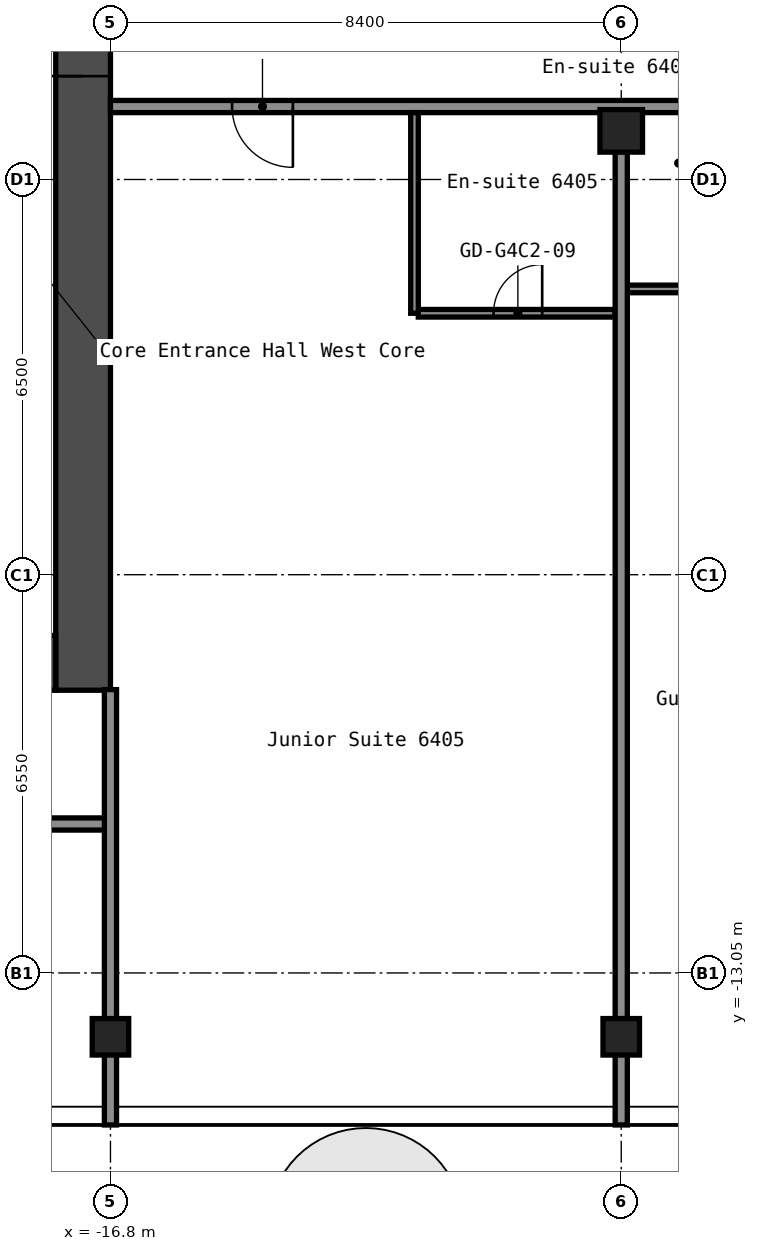
"""IFC4 building model, lengths in metres.
Left out: names, types, materials, properties, quantities, classifications, styles, units other than length and angle.
Written with IfcOpenShell. Run it as: python <this file> out.ifc"""

import sys

from ifc_helpers import new_model, si_unit, direction, frame, frame_2d, origin, origin_2d, place, context, subcontext, project, spatial, rectangle, hollow_rectangle, extrude, element, fill, save


model = new_model("IFC4")
c1 = context("Model", 3, precision=1e-05, world=origin(), true_north=direction((0.0, 1.0)))
c2 = subcontext(c1, "Body", "Model", "MODEL_VIEW")
j1 = project(units=[si_unit("LENGTHUNIT", "METRE"), si_unit("PLANEANGLEUNIT", "RADIAN")], contexts=[c1])
p1 = place(None, origin())
s1 = spatial("IfcSite", under=j1, at=p1, CompositionType="ELEMENT")
p2 = place(p1, origin())
s2 = spatial("IfcBuilding", under=s1, at=p2, CompositionType="ELEMENT")
p3 = place(p2, frame((0.0, 0.0, 225.0)))
s3 = spatial("IfcBuildingStorey", under=s2, at=p3, CompositionType="ELEMENT", Elevation=225.0)
for number, where, z_axis, x_axis in (
    (1, (-16.8, -14.1, 0.0), (0.0, 0.0, 1.0), (1.0, 0.0, 0.0)),
    (2, (-8.4, -14.1, 0.0), (0.0, 0.0, 1.0), (1.0, 0.0, 0.0)),
):
    element("IfcColumn", number, at=place(p3, frame(where, z_axis=z_axis, x_axis=x_axis)), inside=s3, PredefinedType="COLUMN", context=c2, shape_type="SweptSolid", body=[
        extrude(hollow_rectangle(XDim=0.6, YDim=0.6, WallThickness=0.025, InnerFilletRadius=0.038, OuterFilletRadius=0.062, at=origin_2d()), origin(), (0.0, 0.0, 1.0), 2.9),
    ])
p4 = place(p3, frame((-8.4, 0.8, 0.0), z_axis=(0.0, 0.0, 1.0), x_axis=(1.0, 0.0, 0.0)))
e3 = element("IfcColumn", 3, at=p4, inside=s3, PredefinedType="COLUMN", context=c2, shape_type="SweptSolid", body=[
    extrude(hollow_rectangle(XDim=0.7, YDim=0.7, WallThickness=0.028, at=origin_2d()), origin(), (0.0, 0.0, 1.0), 2.9),
])
p5 = place(p3, frame((-17.25, -8.4, 0.0), z_axis=(0.0, 0.0, 1.0), x_axis=(0.0, 1.0, 0.0)))
e4 = element("IfcWall", 4, at=p5, inside=s3, PredefinedType="SHEAR", context=c2, shape_type="SweptSolid", body=[
    extrude(rectangle(XDim=16.8, YDim=0.9, at=frame_2d((8.4, 0.0))), origin(), (0.0, 0.0, 1.0), 2.9),
])
p6 = place(p5, frame((10.1, 0.0, 0.0)))
e5 = element("IfcOpeningElement", 5, at=p6, cuts=e4, PredefinedType="OPENING", context=c2, shape_type="SweptSolid", body=[
    extrude(rectangle(XDim=1.6, YDim=2.1, at=frame_2d((0.8, 1.05))), frame((0.0, 0.46, 0.0), z_axis=(0.0, -1.0, 0.0), x_axis=(1.0, 0.0, 0.0)), (0.0, 0.0, 1.0), 0.92),
])
p7 = place(p3, frame((-32.7, -7.95, 0.0), z_axis=(0.0, 0.0, 1.0), x_axis=(1.0, 0.0, 0.0)))
e6 = element("IfcWall", 6, at=p7, inside=s3, PredefinedType="SHEAR", context=c2, shape_type="SweptSolid", body=[
    extrude(rectangle(XDim=15.0, YDim=0.9, at=frame_2d((7.5, 0.0))), origin(), (0.0, 0.0, 1.0), 2.9),
])
p8 = place(p7, frame((11.45, 0.0, 0.0)))
e7 = element("IfcOpeningElement", 7, at=p8, cuts=e6, PredefinedType="OPENING", context=c2, shape_type="SweptSolid", body=[
    extrude(rectangle(XDim=1.0, YDim=2.1, at=frame_2d((0.5, 1.05))), frame((0.0, 0.46, 0.0), z_axis=(0.0, -1.0, 0.0), x_axis=(1.0, 0.0, 0.0)), (0.0, 0.0, 1.0), 0.92),
])
p9 = place(p3, frame((-38.1, -10.6, 0.0), z_axis=(0.0, 0.0, 1.0), x_axis=(1.0, 0.0, 0.0)))
e8 = element("IfcWall", 8, at=p9, inside=s3, PredefinedType="PARTITIONING", context=c2, shape_type="SweptSolid", body=[
    extrude(rectangle(XDim=21.3, YDim=0.2, at=frame_2d((10.65, 0.0))), origin(), (0.0, 0.0, 1.0), 2.9),
])
p10 = place(p9, frame((1.95, 0.0, 0.0)))
e9 = element("IfcOpeningElement", 9, at=p10, cuts=e8, PredefinedType="OPENING", context=c2, shape_type="SweptSolid", body=[
    extrude(rectangle(XDim=0.9, YDim=2.1, at=frame_2d((0.45, 1.05))), frame((0.0, 0.11, 0.0), z_axis=(0.0, -1.0, 0.0), x_axis=(1.0, 0.0, 0.0)), (0.0, 0.0, 1.0), 0.22),
])
p11 = place(p9, frame((8.2, 0.0, 0.0)))
e10 = element("IfcOpeningElement", 10, at=p11, cuts=e8, PredefinedType="OPENING", context=c2, shape_type="SweptSolid", body=[
    extrude(rectangle(XDim=1.0, YDim=2.1, at=frame_2d((0.5, 1.05))), frame((0.0, 0.11, 0.0), z_axis=(0.0, -1.0, 0.0), x_axis=(1.0, 0.0, 0.0)), (0.0, 0.0, 1.0), 0.22),
])
p12 = place(p9, frame((16.6, 0.0, 0.0)))
e11 = element("IfcOpeningElement", 11, at=p12, cuts=e8, PredefinedType="OPENING", context=c2, shape_type="SweptSolid", body=[
    extrude(rectangle(XDim=1.0, YDim=2.1, at=frame_2d((0.5, 1.05))), frame((0.0, 0.11, 0.0), z_axis=(0.0, -1.0, 0.0), x_axis=(1.0, 0.0, 0.0)), (0.0, 0.0, 1.0), 0.22),
])
p13 = place(p3, frame((-11.738, -2.2, 0.0), z_axis=(0.0, 0.0, 1.0), x_axis=(1.0, 0.0, 0.0)))
e12 = element("IfcWall", 12, at=p13, inside=s3, PredefinedType="PARTITIONING", context=c2, shape_type="SweptSolid", body=[
    extrude(rectangle(XDim=3.238, YDim=0.125, at=frame_2d((1.619, 0.0))), origin(), (0.0, 0.0, 1.0), 2.9),
])
p14 = place(p13, frame((1.238, 0.0, 0.0)))
e13 = element("IfcOpeningElement", 13, at=p14, cuts=e12, PredefinedType="OPENING", context=c2, shape_type="SweptSolid", body=[
    extrude(rectangle(XDim=0.8, YDim=2.1, at=frame_2d((0.4, 1.05))), frame((0.0, 0.073, 0.0), z_axis=(0.0, -1.0, 0.0), x_axis=(1.0, 0.0, 0.0)), (0.0, 0.0, 1.0), 0.145),
])
p15 = place(p3, frame((-8.3, -1.8, 0.0), z_axis=(0.0, 0.0, 1.0), x_axis=(1.0, 0.0, 0.0)))
e14 = element("IfcWall", 14, at=p15, inside=s3, PredefinedType="PARTITIONING", context=c2, shape_type="SweptSolid", body=[
    extrude(rectangle(XDim=2.338, YDim=0.125, at=frame_2d((1.169, 0.0))), origin(), (0.0, 0.0, 1.0), 2.9),
])
p16 = place(p3, frame((-16.8, 1.2, 0.0), z_axis=(0.0, 0.0, 1.0), x_axis=(1.0, 0.0, 0.0)))
e15 = element("IfcWall", 15, at=p16, inside=s3, PredefinedType="PARTITIONING", context=c2, shape_type="SweptSolid", body=[
    extrude(rectangle(XDim=33.6, YDim=0.2, at=frame_2d((16.8, 0.0))), origin(), (0.0, 0.0, 1.0), 2.9),
])
p17 = place(p16, frame((2.0, 0.0, 0.0)))
e16 = element("IfcOpeningElement", 16, at=p17, cuts=e15, PredefinedType="OPENING", context=c2, shape_type="SweptSolid", body=[
    extrude(rectangle(XDim=1.0, YDim=2.1, at=frame_2d((0.5, 1.05))), frame((0.0, 0.11, 0.0), z_axis=(0.0, -1.0, 0.0), x_axis=(1.0, 0.0, 0.0)), (0.0, 0.0, 1.0), 0.22),
])
p18 = place(p16, frame((11.25, 0.0, 0.0)))
e17 = element("IfcOpeningElement", 17, at=p18, cuts=e15, PredefinedType="OPENING", context=c2, shape_type="SweptSolid", body=[
    extrude(rectangle(XDim=1.0, YDim=2.1, at=frame_2d((0.5, 1.05))), frame((0.0, 0.11, 0.0), z_axis=(0.0, -1.0, 0.0), x_axis=(1.0, 0.0, 0.0)), (0.0, 0.0, 1.0), 0.22),
])
p19 = place(p16, frame((12.95, 0.0, 0.0)))
e18 = element("IfcOpeningElement", 18, at=p19, cuts=e15, PredefinedType="OPENING", context=c2, shape_type="SweptSolid", body=[
    extrude(rectangle(XDim=1.0, YDim=2.1, at=frame_2d((0.5, 1.05))), frame((0.0, 0.11, 0.0), z_axis=(0.0, -1.0, 0.0), x_axis=(1.0, 0.0, 0.0)), (0.0, 0.0, 1.0), 0.22),
])
p20 = place(p16, frame((18.785, 0.0, 0.0)))
e19 = element("IfcOpeningElement", 19, at=p20, cuts=e15, PredefinedType="OPENING", context=c2, shape_type="SweptSolid", body=[
    extrude(rectangle(XDim=0.9, YDim=2.1, at=frame_2d((0.45, 1.05))), frame((0.0, 0.11, 0.0), z_axis=(0.0, -1.0, 0.0), x_axis=(1.0, 0.0, 0.0)), (0.0, 0.0, 1.0), 0.22),
])
p21 = place(p16, frame((22.985, 0.0, 0.0)))
e20 = element("IfcOpeningElement", 20, at=p21, cuts=e15, PredefinedType="OPENING", context=c2, shape_type="SweptSolid", body=[
    extrude(rectangle(XDim=0.9, YDim=2.1, at=frame_2d((0.45, 1.05))), frame((0.0, 0.11, 0.0), z_axis=(0.0, -1.0, 0.0), x_axis=(1.0, 0.0, 0.0)), (0.0, 0.0, 1.0), 0.22),
])
p22 = place(p16, frame((28.05, 0.0, 0.0)))
e21 = element("IfcOpeningElement", 21, at=p22, cuts=e15, PredefinedType="OPENING", context=c2, shape_type="SweptSolid", body=[
    extrude(rectangle(XDim=1.0, YDim=2.1, at=frame_2d((0.5, 1.05))), frame((0.0, 0.11, 0.0), z_axis=(0.0, -1.0, 0.0), x_axis=(1.0, 0.0, 0.0)), (0.0, 0.0, 1.0), 0.22),
])
p23 = place(p16, frame((29.75, 0.0, 0.0)))
e22 = element("IfcOpeningElement", 22, at=p23, cuts=e15, PredefinedType="OPENING", context=c2, shape_type="SweptSolid", body=[
    extrude(rectangle(XDim=1.0, YDim=2.1, at=frame_2d((0.5, 1.05))), frame((0.0, 0.11, 0.0), z_axis=(0.0, -1.0, 0.0), x_axis=(1.0, 0.0, 0.0)), (0.0, 0.0, 1.0), 0.22),
])
p24 = place(p3, frame((-16.8, -15.55, 0.0), z_axis=(0.0, 0.0, 1.0), x_axis=(0.0, 1.0, 0.0)))
e23 = element("IfcWall", 23, at=p24, inside=s3, PredefinedType="PARTITIONING", context=c2, shape_type="SweptSolid", body=[
    extrude(rectangle(XDim=7.16, YDim=0.2, at=frame_2d((3.58, 0.0))), origin(), (0.0, 0.0, 1.0), 2.9),
])
p25 = place(p3, frame((-11.8, -2.2, 0.0), z_axis=(0.0, 0.0, 1.0), x_axis=(0.0, 1.0, 0.0)))
e24 = element("IfcWall", 24, at=p25, inside=s3, PredefinedType="PARTITIONING", context=c2, shape_type="SweptSolid", body=[
    extrude(rectangle(XDim=3.3, YDim=0.125, at=frame_2d((1.65, 0.0))), origin(), (0.0, 0.0, 1.0), 2.9),
])
p26 = place(p3, frame((-8.4, -15.55, 0.0), z_axis=(0.0, 0.0, 1.0), x_axis=(0.0, 1.0, 0.0)))
e25 = element("IfcWall", 25, at=p26, inside=s3, PredefinedType="PARTITIONING", context=c2, shape_type="SweptSolid", body=[
    extrude(rectangle(XDim=16.01, YDim=0.2, at=frame_2d((8.005, 0.0))), origin(), (0.0, 0.0, 1.0), 2.9),
])
p27 = place(p6, origin())
e26 = element("IfcDoor", 26, at=p27, inside=s3, OperationType="DOUBLE_DOOR_SINGLE_SWING", PredefinedType="DOOR", context=c2, shape_type="SweptSolid", body=[
    extrude(rectangle(XDim=1.6, YDim=2.1, at=frame_2d((0.8, 1.05))), frame((0.0, 0.025, 0.0), z_axis=(0.0, -1.0, 0.0), x_axis=(1.0, 0.0, 0.0)), (0.0, 0.0, 1.0), 0.05),
])
fill(e5, e26)
p28 = place(p14, origin())
e27 = element("IfcDoor", 27, at=p28, inside=s3, OperationType="SINGLE_SWING_LEFT", PredefinedType="DOOR", context=c2, shape_type="SweptSolid", body=[
    extrude(rectangle(XDim=0.8, YDim=2.1, at=frame_2d((0.4, 1.05))), frame((0.0, 0.025, 0.0), z_axis=(0.0, -1.0, 0.0), x_axis=(1.0, 0.0, 0.0)), (0.0, 0.0, 1.0), 0.05),
])
fill(e13, e27)
p29 = place(p17, origin())
e28 = element("IfcDoor", 28, at=p29, inside=s3, OperationType="SINGLE_SWING_RIGHT", PredefinedType="DOOR", context=c2, shape_type="SweptSolid", body=[
    extrude(rectangle(XDim=1.0, YDim=2.1, at=frame_2d((0.5, 1.05))), frame((0.0, 0.025, 0.0), z_axis=(0.0, -1.0, 0.0), x_axis=(1.0, 0.0, 0.0)), (0.0, 0.0, 1.0), 0.05),
])
fill(e16, e28)
save(model, sys.argv[1])
